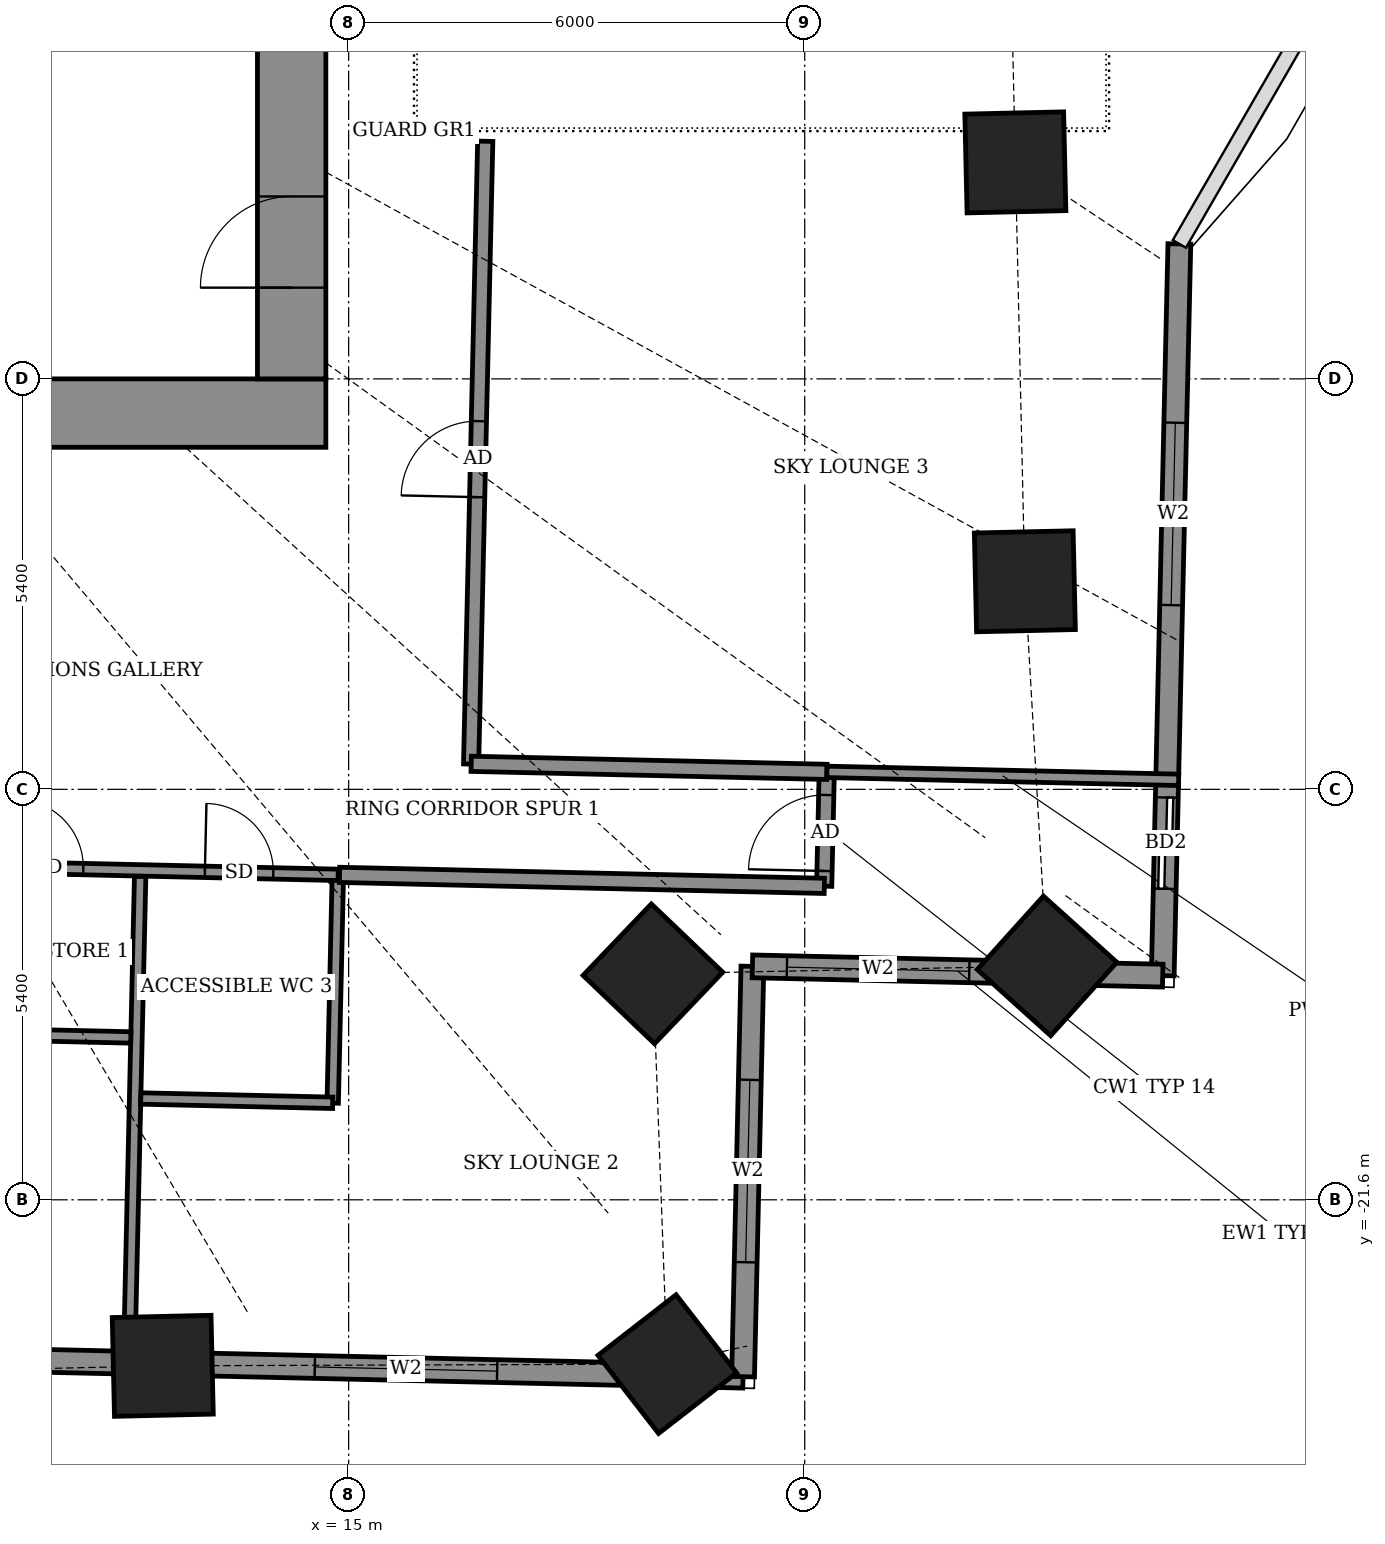
"""IFC4 building model, lengths in metres.
Left out: names, types, materials, properties, quantities, classifications, styles, units other than length and angle.
Written with IfcOpenShell. Run it as: python <this file> out.ifc"""

import sys

from ifc_helpers import new_model, si_unit, direction, frame, frame_2d, origin, origin_2d, place, context, subcontext, project, spatial, rectangle, extrude, element, fill, save


model = new_model("IFC4")
c1 = context("Model", 3, precision=1e-05, world=origin(), true_north=direction((0.0, 1.0)))
c2 = subcontext(c1, "Body", "Model", "MODEL_VIEW")
j1 = project(units=[si_unit("LENGTHUNIT", "METRE"), si_unit("PLANEANGLEUNIT", "RADIAN")], contexts=[c1])
p1 = place(None, origin())
s1 = spatial("IfcSite", under=j1, at=p1, CompositionType="ELEMENT")
p2 = place(p1, origin())
s2 = spatial("IfcBuilding", under=s1, at=p2, CompositionType="ELEMENT")
p3 = place(p2, frame((0.0, 0.0, 148.1)))
s3 = spatial("IfcBuildingStorey", under=s2, at=p3, CompositionType="ELEMENT", Elevation=148.1)
for number, where, z_axis, x_axis in (
    (1, (12.554, -23.784, -0.55), (0.0, 0.0, 1.0), (1.0, 0.023, 0.0)),
    (2, (19.192, -23.761, -0.55), (0.0, 0.0, 1.0), (0.79, 0.613, 0.0)),
    (3, (19.003, -18.627, -0.55), (0.0, 0.0, 1.0), (0.691, 0.723, 0.0)),
    (4, (24.188, -18.523, -0.55), (0.0, 0.0, 1.0), (0.67, 0.743, 0.0)),
    (5, (23.896, -13.463, -0.55), (0.0, 0.0, 1.0), (-0.023, 1.0, 0.0)),
    (6, (23.771, -7.952, -0.55), (0.0, 0.0, 1.0), (-0.023, 1.0, 0.0)),
):
    element("IfcColumn", number, at=place(p3, frame(where, z_axis=z_axis, x_axis=x_axis)), inside=s3, PredefinedType="COLUMN", context=c2, shape_type="SweptSolid", body=[
        extrude(rectangle(XDim=1.3, YDim=1.3, at=origin_2d()), origin(), (0.0, 0.0, 1.0), 4.6),
    ])
p4 = place(p3, frame((25.71, -18.651, 0.0), z_axis=(0.0, 0.0, 1.0), x_axis=(0.02274444447, 0.999741311663, 0.0)))
e7 = element("IfcWall", 7, at=p4, inside=s3, PredefinedType="SOLIDWALL", context=c2, shape_type="SweptSolid", body=[
    extrude(rectangle(XDim=9.628, YDim=0.3, at=frame_2d((4.814, 0.0))), origin(), (0.0, 0.0, 1.0), 2.85),
])
p5 = place(p4, frame((1.144, 0.0, 0.0)))
e8 = element("IfcOpeningElement", 8, at=p5, cuts=e7, PredefinedType="OPENING", context=c2, shape_type="SweptSolid", body=[
    extrude(rectangle(XDim=1.2, YDim=2.4, at=frame_2d((0.6, 1.2))), frame((0.0, 0.16, 0.0), z_axis=(0.0, -1.0, 0.0), x_axis=(1.0, 0.0, 0.0)), (0.0, 0.0, 1.0), 0.32),
])
p6 = place(p4, frame((4.876, 0.0, 0.9)))
e9 = element("IfcOpeningElement", 9, at=p6, cuts=e7, PredefinedType="OPENING", context=c2, shape_type="SweptSolid", body=[
    extrude(rectangle(XDim=2.4, YDim=1.5, at=frame_2d((1.2, 0.75))), frame((0.0, 0.16, 0.0), z_axis=(0.0, -1.0, 0.0), x_axis=(1.0, 0.0, 0.0)), (0.0, 0.0, 1.0), 0.32),
])
p7 = place(p3, frame((-18.781, -23.043, 0.0), z_axis=(0.0, 0.0, 1.0), x_axis=(0.999742794992, -0.022679150367, 0.0)))
e10 = element("IfcWall", 10, at=p7, inside=s3, PredefinedType="SOLIDWALL", context=c2, shape_type="SweptSolid", body=[
    extrude(rectangle(XDim=38.98, YDim=0.3, at=frame_2d((19.49, 0.0))), origin(), (0.0, 0.0, 1.0), 2.45),
])
p8 = place(p7, frame((5.153, 0.0, 0.0)))
e11 = element("IfcOpeningElement", 11, at=p8, cuts=e10, PredefinedType="OPENING", context=c2, shape_type="SweptSolid", body=[
    extrude(rectangle(XDim=1.5, YDim=2.4, at=frame_2d((0.75, 1.2))), frame((0.0, 0.16, 0.0), z_axis=(0.0, -1.0, 0.0), x_axis=(1.0, 0.0, 0.0)), (0.0, 0.0, 1.0), 0.32),
])
p9 = place(p7, frame((11.086, 0.0, 0.9)))
e12 = element("IfcOpeningElement", 12, at=p9, cuts=e10, PredefinedType="OPENING", context=c2, shape_type="SweptSolid", body=[
    extrude(rectangle(XDim=1.2, YDim=1.5, at=frame_2d((0.6, 0.75))), frame((0.0, 0.16, 0.0), z_axis=(0.0, -1.0, 0.0), x_axis=(1.0, 0.0, 0.0)), (0.0, 0.0, 1.0), 0.32),
])
p10 = place(p7, frame((13.99, 0.0, 0.0)))
e13 = element("IfcOpeningElement", 13, at=p10, cuts=e10, PredefinedType="OPENING", context=c2, shape_type="SweptSolid", body=[
    extrude(rectangle(XDim=1.5, YDim=2.4, at=frame_2d((0.75, 1.2))), frame((0.0, 0.16, 0.0), z_axis=(0.0, -1.0, 0.0), x_axis=(1.0, 0.0, 0.0)), (0.0, 0.0, 1.0), 0.32),
])
p11 = place(p7, frame((19.869, 0.0, 0.0)))
e14 = element("IfcOpeningElement", 14, at=p11, cuts=e10, PredefinedType="OPENING", context=c2, shape_type="SweptSolid", body=[
    extrude(rectangle(XDim=1.5, YDim=2.4, at=frame_2d((0.75, 1.2))), frame((0.0, 0.16, 0.0), z_axis=(0.0, -1.0, 0.0), x_axis=(1.0, 0.0, 0.0)), (0.0, 0.0, 1.0), 0.32),
])
p12 = place(p7, frame((26.635, 0.0, 0.9)))
e15 = element("IfcOpeningElement", 15, at=p12, cuts=e10, PredefinedType="OPENING", context=c2, shape_type="SweptSolid", body=[
    extrude(rectangle(XDim=2.4, YDim=1.5, at=frame_2d((1.2, 0.75))), frame((0.0, 0.16, 0.0), z_axis=(0.0, -1.0, 0.0), x_axis=(1.0, 0.0, 0.0)), (0.0, 0.0, 1.0), 0.32),
])
p13 = place(p7, frame((33.344, 0.0, 0.9)))
e16 = element("IfcOpeningElement", 16, at=p13, cuts=e10, PredefinedType="OPENING", context=c2, shape_type="SweptSolid", body=[
    extrude(rectangle(XDim=2.4, YDim=1.5, at=frame_2d((1.2, 0.75))), frame((0.0, 0.16, 0.0), z_axis=(0.0, -1.0, 0.0), x_axis=(1.0, 0.0, 0.0)), (0.0, 0.0, 1.0), 0.32),
])
p14 = place(p3, frame((20.189, -23.927, 0.0), z_axis=(0.0, 0.0, 1.0), x_axis=(0.022789195272, 0.999740292565, 0.0)))
e17 = element("IfcWall", 17, at=p14, inside=s3, PredefinedType="SOLIDWALL", context=c2, shape_type="SweptSolid", body=[
    extrude(rectangle(XDim=5.399, YDim=0.3, at=frame_2d((2.7, 0.0))), origin(), (0.0, 0.0, 1.0), 2.75),
])
p15 = place(p14, frame((1.506, 0.0, 0.9)))
e18 = element("IfcOpeningElement", 18, at=p15, cuts=e17, PredefinedType="OPENING", context=c2, shape_type="SweptSolid", body=[
    extrude(rectangle(XDim=2.4, YDim=1.5, at=frame_2d((1.2, 0.75))), frame((0.0, 0.16, 0.0), z_axis=(0.0, -1.0, 0.0), x_axis=(1.0, 0.0, 0.0)), (0.0, 0.0, 1.0), 0.32),
])
p16 = place(p3, frame((20.312, -18.529, 0.0), z_axis=(0.0, 0.0, 1.0), x_axis=(0.999745417973, -0.02256322766, 0.0)))
e19 = element("IfcWall", 19, at=p16, inside=s3, PredefinedType="SOLIDWALL", context=c2, shape_type="SweptSolid", body=[
    extrude(rectangle(XDim=5.399, YDim=0.3, at=frame_2d((2.7, 0.0))), origin(), (0.0, 0.0, 1.0), 2.75),
])
p17 = place(p16, frame((0.454, 0.0, 0.9)))
e20 = element("IfcOpeningElement", 20, at=p17, cuts=e19, PredefinedType="OPENING", context=c2, shape_type="SweptSolid", body=[
    extrude(rectangle(XDim=2.4, YDim=1.5, at=frame_2d((1.2, 0.75))), frame((0.0, 0.16, 0.0), z_axis=(0.0, -1.0, 0.0), x_axis=(1.0, 0.0, 0.0)), (0.0, 0.0, 1.0), 0.32),
])
p18 = place(p3, frame((12.108, -23.894, 0.0), z_axis=(0.0, 0.0, 1.0), x_axis=(0.022771353855, 0.999740699103, 0.0)))
e21 = element("IfcWall", 21, at=p18, inside=s3, PredefinedType="PARTITIONING", context=c2, shape_type="SweptSolid", body=[
    extrude(rectangle(XDim=6.551, YDim=0.15, at=frame_2d((3.275, 0.0))), origin(), (0.0, 0.0, 1.0), 2.65),
])
p19 = place(p3, frame((14.79, -20.328, 0.0), z_axis=(0.0, 0.0, 1.0), x_axis=(0.02262711266, 0.999743974112, 0.0)))
e22 = element("IfcWall", 22, at=p19, inside=s3, PredefinedType="PARTITIONING", context=c2, shape_type="SweptSolid", body=[
    extrude(rectangle(XDim=3.0, YDim=0.15, at=frame_2d((1.5, 0.0))), origin(), (0.0, 0.0, 1.0), 2.65),
])
p20 = place(p3, frame((12.265, -20.267, 0.0), z_axis=(0.0, 0.0, 1.0), x_axis=(0.999746356616, -0.022521599255, 0.0)))
e23 = element("IfcWall", 23, at=p20, inside=s3, PredefinedType="PARTITIONING", context=c2, shape_type="SweptSolid", body=[
    extrude(rectangle(XDim=2.526, YDim=0.15, at=frame_2d((1.263, 0.0))), origin(), (0.0, 0.0, 1.0), 2.65),
])
p21 = place(p3, frame((9.809, -19.411, 0.0), z_axis=(0.0, 0.0, 1.0), x_axis=(0.999738082346, -0.022885950011, 0.0)))
e24 = element("IfcWall", 24, at=p21, inside=s3, PredefinedType="PARTITIONING", context=c2, shape_type="SweptSolid", body=[
    extrude(rectangle(XDim=2.325, YDim=0.15, at=frame_2d((1.163, 0.0))), origin(), (0.0, 0.0, 1.0), 2.65),
])
p22 = place(p3, frame((21.256, -17.474, 0.0), z_axis=(0.0, 0.0, 1.0), x_axis=(0.022617910375, 0.999744182344, 0.0)))
e25 = element("IfcWall", 25, at=p22, inside=s3, PredefinedType="PARTITIONING", context=c2, shape_type="SweptSolid", body=[
    extrude(rectangle(XDim=1.5, YDim=0.2, at=frame_2d((0.75, 0.0))), origin(), (0.0, 0.0, 1.0), 2.85),
])
p23 = place(p22, frame((0.2, 0.0, 0.0)))
e26 = element("IfcOpeningElement", 26, at=p23, cuts=e25, PredefinedType="OPENING", context=c2, shape_type="SweptSolid", body=[
    extrude(rectangle(XDim=1.0, YDim=2.1, at=frame_2d((0.5, 1.05))), frame((0.0, 0.11, 0.0), z_axis=(0.0, -1.0, 0.0), x_axis=(1.0, 0.0, 0.0)), (0.0, 0.0, 1.0), 0.22),
])
p24 = place(p3, frame((-15.649, -16.633, 0.0), z_axis=(0.0, 0.0, 1.0), x_axis=(0.999742978268, -0.022671069754, 0.0)))
e27 = element("IfcWall", 27, at=p24, inside=s3, PredefinedType="PARTITIONING", context=c2, shape_type="SweptSolid", body=[
    extrude(rectangle(XDim=30.519, YDim=0.15, at=frame_2d((15.259, 0.0))), origin(), (0.0, 0.0, 1.0), 2.45),
])
p25 = place(p24, frame((3.365, 0.0, 0.0)))
e28 = element("IfcOpeningElement", 28, at=p25, cuts=e27, PredefinedType="OPENING", context=c2, shape_type="SweptSolid", body=[
    extrude(rectangle(XDim=0.9, YDim=2.1, at=frame_2d((0.45, 1.05))), frame((0.0, 0.085, 0.0), z_axis=(0.0, -1.0, 0.0), x_axis=(1.0, 0.0, 0.0)), (0.0, 0.0, 1.0), 0.17),
])
p26 = place(p24, frame((6.865, 0.0, 0.0)))
e29 = element("IfcOpeningElement", 29, at=p26, cuts=e27, PredefinedType="OPENING", context=c2, shape_type="SweptSolid", body=[
    extrude(rectangle(XDim=1.0, YDim=2.1, at=frame_2d((0.5, 1.05))), frame((0.0, 0.085, 0.0), z_axis=(0.0, -1.0, 0.0), x_axis=(1.0, 0.0, 0.0)), (0.0, 0.0, 1.0), 0.17),
])
p27 = place(p24, frame((10.44, 0.0, 0.0)))
e30 = element("IfcOpeningElement", 30, at=p27, cuts=e27, PredefinedType="OPENING", context=c2, shape_type="SweptSolid", body=[
    extrude(rectangle(XDim=0.9, YDim=2.1, at=frame_2d((0.45, 1.05))), frame((0.0, 0.085, 0.0), z_axis=(0.0, -1.0, 0.0), x_axis=(1.0, 0.0, 0.0)), (0.0, 0.0, 1.0), 0.17),
])
p28 = place(p24, frame((18.34, 0.0, 0.0)))
e31 = element("IfcOpeningElement", 31, at=p28, cuts=e27, PredefinedType="OPENING", context=c2, shape_type="SweptSolid", body=[
    extrude(rectangle(XDim=1.0, YDim=2.1, at=frame_2d((0.5, 1.05))), frame((0.0, 0.085, 0.0), z_axis=(0.0, -1.0, 0.0), x_axis=(1.0, 0.0, 0.0)), (0.0, 0.0, 1.0), 0.17),
])
p29 = place(p24, frame((15.415, 0.0, 0.0)))
e32 = element("IfcOpeningElement", 32, at=p29, cuts=e27, PredefinedType="OPENING", context=c2, shape_type="SweptSolid", body=[
    extrude(rectangle(XDim=0.9, YDim=2.1, at=frame_2d((0.45, 1.05))), frame((0.0, 0.085, 0.0), z_axis=(0.0, -1.0, 0.0), x_axis=(1.0, 0.0, 0.0)), (0.0, 0.0, 1.0), 0.17),
])
p30 = place(p24, frame((22.515, 0.0, 0.0)))
e33 = element("IfcOpeningElement", 33, at=p30, cuts=e27, PredefinedType="OPENING", context=c2, shape_type="SweptSolid", body=[
    extrude(rectangle(XDim=1.0, YDim=2.1, at=frame_2d((0.5, 1.05))), frame((0.0, 0.085, 0.0), z_axis=(0.0, -1.0, 0.0), x_axis=(1.0, 0.0, 0.0)), (0.0, 0.0, 1.0), 0.17),
])
p31 = place(p24, frame((26.265, 0.0, 0.0)))
e34 = element("IfcOpeningElement", 34, at=p31, cuts=e27, PredefinedType="OPENING", context=c2, shape_type="SweptSolid", body=[
    extrude(rectangle(XDim=0.9, YDim=2.1, at=frame_2d((0.45, 1.05))), frame((0.0, 0.085, 0.0), z_axis=(0.0, -1.0, 0.0), x_axis=(1.0, 0.0, 0.0)), (0.0, 0.0, 1.0), 0.17),
])
p32 = place(p24, frame((28.765, 0.0, 0.0)))
e35 = element("IfcOpeningElement", 35, at=p32, cuts=e27, PredefinedType="OPENING", context=c2, shape_type="SweptSolid", body=[
    extrude(rectangle(XDim=0.9, YDim=2.1, at=frame_2d((0.45, 1.05))), frame((0.0, 0.085, 0.0), z_axis=(0.0, -1.0, 0.0), x_axis=(1.0, 0.0, 0.0)), (0.0, 0.0, 1.0), 0.17),
])
p33 = place(p3, frame((14.88, -17.325, 0.0), z_axis=(0.0, 0.0, 1.0), x_axis=(0.999741618182, -0.022730967319, 0.0)))
e36 = element("IfcWall", 36, at=p33, inside=s3, PredefinedType="PARTITIONING", context=c2, shape_type="SweptSolid", body=[
    extrude(rectangle(XDim=6.38, YDim=0.2, at=frame_2d((3.19, 0.0))), origin(), (0.0, 0.0, 1.0), 2.65),
])
p34 = place(p3, frame((16.611, -15.868, 0.0), z_axis=(0.0, 0.0, 1.0), x_axis=(0.022698399288, 0.999742358145, 0.0)))
e37 = element("IfcWall", 37, at=p34, inside=s3, PredefinedType="PARTITIONING", context=c2, shape_type="SweptSolid", body=[
    extrude(rectangle(XDim=8.196, YDim=0.2, at=frame_2d((4.098, 0.0))), origin(), (0.0, 0.0, 1.0), 2.85),
])
p35 = place(p34, frame((3.513, 0.0, 0.0)))
e38 = element("IfcOpeningElement", 38, at=p35, cuts=e37, PredefinedType="OPENING", context=c2, shape_type="SweptSolid", body=[
    extrude(rectangle(XDim=1.0, YDim=2.1, at=frame_2d((0.5, 1.05))), frame((0.0, 0.11, 0.0), z_axis=(0.0, -1.0, 0.0), x_axis=(1.0, 0.0, 0.0)), (0.0, 0.0, 1.0), 0.22),
])
p36 = place(p3, frame((16.612, -15.864, 0.0), z_axis=(0.0, 0.0, 1.0), x_axis=(0.999743797347, -0.022634921386, 0.0)))
e39 = element("IfcWall", 39, at=p36, inside=s3, PredefinedType="PARTITIONING", context=c2, shape_type="SweptSolid", body=[
    extrude(rectangle(XDim=4.681, YDim=0.2, at=frame_2d((2.341, 0.0))), origin(), (0.0, 0.0, 1.0), 2.85),
])
p37 = place(p3, frame((21.292, -15.97, 0.0), z_axis=(0.0, 0.0, 1.0), x_axis=(0.999742706282, -0.022683060558, 0.0)))
e40 = element("IfcWall", 40, at=p37, inside=s3, PredefinedType="PARTITIONING", context=c2, shape_type="SweptSolid", body=[
    extrude(rectangle(XDim=4.628, YDim=0.15, at=frame_2d((2.314, 0.0))), origin(), (0.0, 0.0, 1.0), 2.75),
])
p38 = place(p3, frame((-14.7, -11.25, 0.0), z_axis=(0.0, 0.0, 1.0), x_axis=(1.0, 0.0, 0.0)))
e41 = element("IfcWall", 41, at=p38, inside=s3, PredefinedType="SHEAR", context=c2, shape_type="SweptSolid", body=[
    extrude(rectangle(XDim=29.4, YDim=0.9, at=frame_2d((14.7, 0.0))), origin(), (0.0, 0.0, 1.0), 4.6),
])
p39 = place(p3, frame((14.25, -10.8, 0.0), z_axis=(0.0, 0.0, 1.0), x_axis=(0.0, 1.0, 0.0)))
e42 = element("IfcWall", 42, at=p39, inside=s3, PredefinedType="SHEAR", context=c2, shape_type="SweptSolid", body=[
    extrude(rectangle(XDim=21.6, YDim=0.9, at=frame_2d((10.8, 0.0))), origin(), (0.0, 0.0, 1.0), 4.6),
])
p40 = place(p39, frame((1.2, 0.0, 0.0)))
e43 = element("IfcOpeningElement", 43, at=p40, cuts=e42, PredefinedType="OPENING", context=c2, shape_type="SweptSolid", body=[
    extrude(rectangle(XDim=1.2, YDim=2.1, at=frame_2d((0.6, 1.05))), frame((0.0, 0.46, 0.0), z_axis=(0.0, -1.0, 0.0), x_axis=(1.0, 0.0, 0.0)), (0.0, 0.0, 1.0), 0.92),
])
p41 = place(p5, origin())
e44 = element("IfcDoor", 44, at=p41, inside=s3, OperationType="SLIDING_TO_LEFT", PredefinedType="DOOR", context=c2, shape_type="SweptSolid", body=[
    extrude(rectangle(XDim=1.2, YDim=2.4, at=frame_2d((0.6, 1.2))), frame((0.0, 0.025, 0.0), z_axis=(0.0, -1.0, 0.0), x_axis=(1.0, 0.0, 0.0)), (0.0, 0.0, 1.0), 0.05),
])
fill(e8, e44)
p42 = place(p6, origin())
e45 = element("IfcWindow", 45, at=p42, inside=s3, PartitioningType="DOUBLE_PANEL_VERTICAL", PredefinedType="WINDOW", context=c2, shape_type="SweptSolid", body=[
    extrude(rectangle(XDim=2.4, YDim=1.5, at=frame_2d((1.2, 0.75))), frame((0.0, 0.03, 0.0), z_axis=(0.0, -1.0, 0.0), x_axis=(1.0, 0.0, 0.0)), (0.0, 0.0, 1.0), 0.06),
])
fill(e9, e45)
p43 = place(p13, origin())
e46 = element("IfcWindow", 46, at=p43, inside=s3, PartitioningType="DOUBLE_PANEL_VERTICAL", PredefinedType="WINDOW", context=c2, shape_type="SweptSolid", body=[
    extrude(rectangle(XDim=2.4, YDim=1.5, at=frame_2d((1.2, 0.75))), frame((0.0, 0.03, 0.0), z_axis=(0.0, -1.0, 0.0), x_axis=(1.0, 0.0, 0.0)), (0.0, 0.0, 1.0), 0.06),
])
fill(e16, e46)
p44 = place(p15, origin())
e47 = element("IfcWindow", 47, at=p44, inside=s3, PartitioningType="DOUBLE_PANEL_VERTICAL", PredefinedType="WINDOW", context=c2, shape_type="SweptSolid", body=[
    extrude(rectangle(XDim=2.4, YDim=1.5, at=frame_2d((1.2, 0.75))), frame((0.0, 0.03, 0.0), z_axis=(0.0, -1.0, 0.0), x_axis=(1.0, 0.0, 0.0)), (0.0, 0.0, 1.0), 0.06),
])
fill(e18, e47)
p45 = place(p17, origin())
e48 = element("IfcWindow", 48, at=p45, inside=s3, PartitioningType="DOUBLE_PANEL_VERTICAL", PredefinedType="WINDOW", context=c2, shape_type="SweptSolid", body=[
    extrude(rectangle(XDim=2.4, YDim=1.5, at=frame_2d((1.2, 0.75))), frame((0.0, 0.03, 0.0), z_axis=(0.0, -1.0, 0.0), x_axis=(1.0, 0.0, 0.0)), (0.0, 0.0, 1.0), 0.06),
])
fill(e20, e48)
p46 = place(p31, origin())
e49 = element("IfcDoor", 49, at=p46, inside=s3, OperationType="SINGLE_SWING_LEFT", PredefinedType="DOOR", context=c2, shape_type="SweptSolid", body=[
    extrude(rectangle(XDim=0.9, YDim=2.1, at=frame_2d((0.45, 1.05))), frame((0.0, 0.025, 0.0), z_axis=(0.0, -1.0, 0.0), x_axis=(1.0, 0.0, 0.0)), (0.0, 0.0, 1.0), 0.05),
])
fill(e34, e49)
p47 = place(p23, origin())
e50 = element("IfcDoor", 50, at=p47, inside=s3, OperationType="SINGLE_SWING_LEFT", PredefinedType="DOOR", context=c2, shape_type="SweptSolid", body=[
    extrude(rectangle(XDim=1.0, YDim=2.1, at=frame_2d((0.5, 1.05))), frame((0.0, 0.025, 0.0), z_axis=(0.0, -1.0, 0.0), x_axis=(1.0, 0.0, 0.0)), (0.0, 0.0, 1.0), 0.05),
])
fill(e26, e50)
p48 = place(p32, origin())
e51 = element("IfcDoor", 51, at=p48, inside=s3, OperationType="SINGLE_SWING_RIGHT", PredefinedType="DOOR", context=c2, shape_type="SweptSolid", body=[
    extrude(rectangle(XDim=0.9, YDim=2.1, at=frame_2d((0.45, 1.05))), frame((0.0, 0.025, 0.0), z_axis=(0.0, -1.0, 0.0), x_axis=(1.0, 0.0, 0.0)), (0.0, 0.0, 1.0), 0.05),
])
fill(e35, e51)
p49 = place(p35, origin())
e52 = element("IfcDoor", 52, at=p49, inside=s3, OperationType="SINGLE_SWING_RIGHT", PredefinedType="DOOR", context=c2, shape_type="SweptSolid", body=[
    extrude(rectangle(XDim=1.0, YDim=2.1, at=frame_2d((0.5, 1.05))), frame((0.0, 0.025, 0.0), z_axis=(0.0, -1.0, 0.0), x_axis=(1.0, 0.0, 0.0)), (0.0, 0.0, 1.0), 0.05),
])
fill(e38, e52)
p50 = place(p40, origin())
e53 = element("IfcDoor", 53, at=p50, inside=s3, OperationType="DOUBLE_DOOR_SINGLE_SWING", PredefinedType="DOOR", context=c2, shape_type="SweptSolid", body=[
    extrude(rectangle(XDim=1.2, YDim=2.1, at=frame_2d((0.6, 1.05))), frame((0.0, 0.025, 0.0), z_axis=(0.0, -1.0, 0.0), x_axis=(1.0, 0.0, 0.0)), (0.0, 0.0, 1.0), 0.05),
])
fill(e43, e53)
save(model, sys.argv[1])
